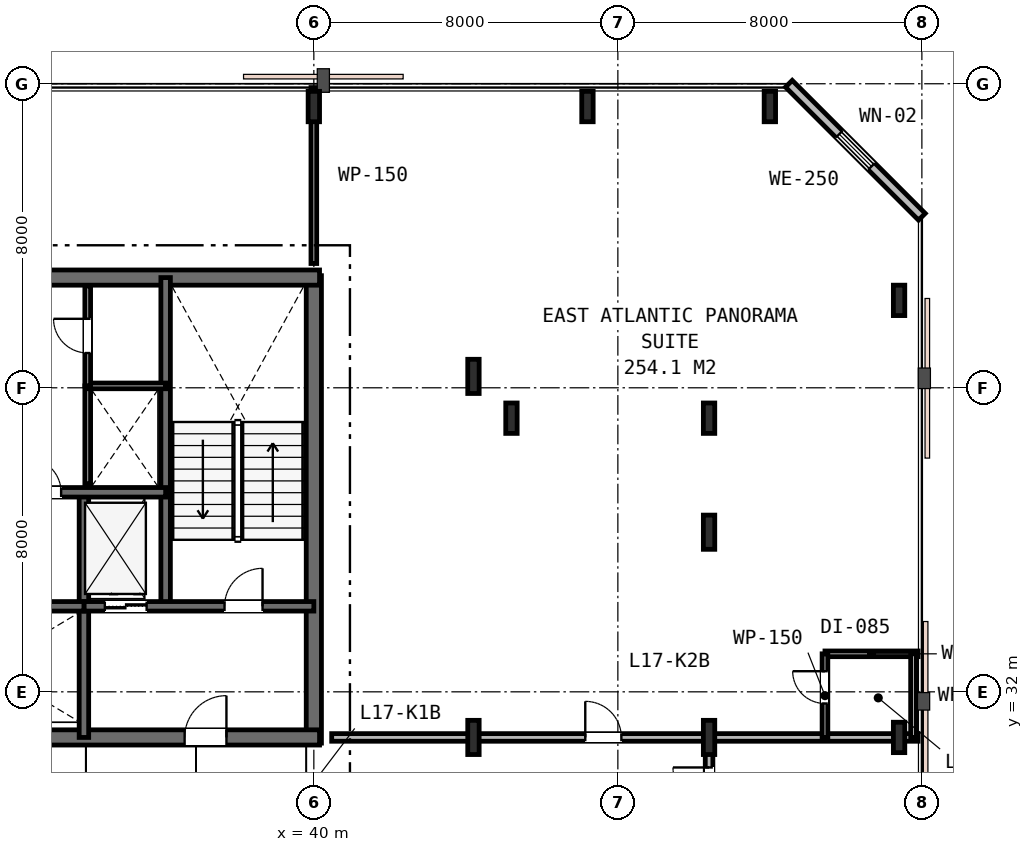
"""IFC4 building model, lengths in metres.
Left out: names, types, materials, properties, quantities, classifications, styles, units other than length and angle.
Written with IfcOpenShell. Run it as: python <this file> out.ifc"""

import sys

from ifc_helpers import new_model, si_unit, direction, frame, frame_2d, origin, origin_2d, place, context, subcontext, project, spatial, rectangle, i_section, extrude, element, fill, save


model = new_model("IFC4")
c1 = context("Model", 3, precision=1e-05, world=origin(), true_north=direction((0.0, 1.0)))
c2 = subcontext(c1, "Body", "Model", "MODEL_VIEW")
j1 = project(units=[si_unit("LENGTHUNIT", "METRE"), si_unit("PLANEANGLEUNIT", "RADIAN")], contexts=[c1])
p1 = place(None, origin())
s1 = spatial("IfcSite", under=j1, at=p1, CompositionType="ELEMENT")
p2 = place(p1, origin())
s2 = spatial("IfcBuilding", under=s1, at=p2, CompositionType="ELEMENT")
p3 = place(p2, frame((0.0, 0.0, 69.0)))
s3 = spatial("IfcBuildingStorey", under=s2, at=p3, CompositionType="ELEMENT", Elevation=69.0)
p4 = place(p3, frame((40.0, 30.65, 0.0), z_axis=(0.0, 0.0, 1.0), x_axis=(0.0, 1.0, 0.0)))
e1 = element("IfcWall", 1, at=p4, inside=s3, PredefinedType="SHEAR", context=c2, shape_type="SweptSolid", body=[
    extrude(rectangle(XDim=12.3, YDim=0.4, at=frame_2d((6.15, 0.0))), origin(), (0.0, 0.0, 1.0), 3.6),
])
p5 = place(p3, frame((15.85, 42.9, 0.0), z_axis=(0.0, 0.0, 1.0), x_axis=(1.0, 0.0, 0.0)))
e2 = element("IfcWall", 2, at=p5, inside=s3, PredefinedType="SHEAR", context=c2, shape_type="SweptSolid", body=[
    extrude(rectangle(XDim=24.3, YDim=0.4, at=frame_2d((12.15, 0.0))), origin(), (0.0, 0.0, 1.0), 3.6),
])
p6 = place(p3, frame((28.95, 30.8, 0.0), z_axis=(0.0, 0.0, 1.0), x_axis=(1.0, 0.0, 0.0)))
e3 = element("IfcWall", 3, at=p6, inside=s3, PredefinedType="SHEAR", context=c2, shape_type="SweptSolid", body=[
    extrude(rectangle(XDim=11.2, YDim=0.4, at=frame_2d((5.6, 0.0))), origin(), (0.0, 0.0, 1.0), 3.6),
])
p7 = place(p6, frame((7.65, 0.0, 0.0)))
e4 = element("IfcOpeningElement", 4, at=p7, cuts=e3, PredefinedType="OPENING", context=c2, shape_type="SweptSolid", body=[
    extrude(rectangle(XDim=1.1, YDim=2.15, at=frame_2d((0.55, 1.075))), frame((0.0, 0.21, 0.0), z_axis=(0.0, -1.0, 0.0), x_axis=(1.0, 0.0, 0.0)), (0.0, 0.0, 1.0), 0.42),
])
p8 = place(p3, frame((36.1, 34.25, 0.0), z_axis=(0.0, 0.0, 1.0), x_axis=(0.0, 1.0, 0.0)))
e5 = element("IfcWall", 5, at=p8, inside=s3, PredefinedType="SHEAR", context=c2, shape_type="SweptSolid", body=[
    extrude(rectangle(XDim=8.65, YDim=0.25, at=frame_2d((4.325, 0.0))), origin(), (0.0, 0.0, 1.0), 3.6),
])
p9 = place(p3, frame((33.95, 30.8, 0.0), z_axis=(0.0, 0.0, 1.0), x_axis=(0.0, 1.0, 0.0)))
e6 = element("IfcWall", 6, at=p9, inside=s3, PredefinedType="SHEAR", context=c2, shape_type="SweptSolid", body=[
    extrude(rectangle(XDim=6.45, YDim=0.25, at=frame_2d((3.225, 0.0))), origin(), (0.0, 0.0, 1.0), 3.6),
])
p10 = place(p3, frame((33.95, 34.25, 0.0), z_axis=(0.0, 0.0, 1.0), x_axis=(1.0, 0.0, 0.0)))
e7 = element("IfcWall", 7, at=p10, inside=s3, PredefinedType="SHEAR", context=c2, shape_type="SweptSolid", body=[
    extrude(rectangle(XDim=6.05, YDim=0.25, at=frame_2d((3.025, 0.0))), origin(), (0.0, 0.0, 1.0), 3.6),
])
p11 = place(p10, frame((3.7, 0.0, 0.0)))
e8 = element("IfcOpeningElement", 8, at=p11, cuts=e7, PredefinedType="OPENING", context=c2, shape_type="SweptSolid", body=[
    extrude(rectangle(XDim=1.0, YDim=2.15, at=frame_2d((0.5, 1.075))), frame((0.0, 0.135, 0.0), z_axis=(0.0, -1.0, 0.0), x_axis=(1.0, 0.0, 0.0)), (0.0, 0.0, 1.0), 0.27),
])
p12 = place(p10, frame((0.55, 0.0, 0.0)))
e9 = element("IfcOpeningElement", 9, at=p12, cuts=e7, PredefinedType="OPENING", context=c2, shape_type="SweptSolid", body=[
    extrude(rectangle(XDim=1.1, YDim=2.15, at=frame_2d((0.55, 1.075))), frame((0.0, 0.135, 0.0), z_axis=(0.0, -1.0, 0.0), x_axis=(1.0, 0.0, 0.0)), (0.0, 0.0, 1.0), 0.27),
])
p13 = place(p3, frame((28.95, 34.25, 0.0), z_axis=(0.0, 0.0, 1.0), x_axis=(1.0, 0.0, 0.0)))
e10 = element("IfcWall", 10, at=p13, inside=s3, PredefinedType="SHEAR", context=c2, shape_type="SweptSolid", body=[
    extrude(rectangle(XDim=5.0, YDim=0.25, at=frame_2d((2.5, 0.0))), origin(), (0.0, 0.0, 1.0), 3.6),
])
p14 = place(p3, frame((19.9, 37.25, 0.0), z_axis=(0.0, 0.0, 1.0), x_axis=(1.0, 0.0, 0.0)))
e11 = element("IfcWall", 11, at=p14, inside=s3, PredefinedType="SHEAR", context=c2, shape_type="SweptSolid", body=[
    extrude(rectangle(XDim=16.2, YDim=0.25, at=frame_2d((8.1, 0.0))), origin(), (0.0, 0.0, 1.0), 3.6),
])
p15 = place(p14, frame((12.55, 0.0, 0.0)))
e12 = element("IfcOpeningElement", 12, at=p15, cuts=e11, PredefinedType="OPENING", context=c2, shape_type="SweptSolid", body=[
    extrude(rectangle(XDim=0.9, YDim=2.15, at=frame_2d((0.45, 1.075))), frame((0.0, 0.135, 0.0), z_axis=(0.0, -1.0, 0.0), x_axis=(1.0, 0.0, 0.0)), (0.0, 0.0, 1.0), 0.27),
])
for number, where, z_axis, x_axis in (
    (13, (45.2, 39.2, 0.0), (0.0, 0.0, 1.0), (1.0, 0.0, 0.0)),
    (14, (40.0, 47.4, 0.0), (0.0, 0.0, 1.0), (1.0, 0.0, 0.0)),
    (15, (47.2, 47.4, 0.0), (0.0, 0.0, 1.0), (1.0, 0.0, 0.0)),
    (16, (50.4, 39.2, 0.0), (0.0, 0.0, 1.0), (1.0, 0.0, 0.0)),
    (17, (55.4, 30.8, 0.0), (0.0, 0.0, 1.0), (1.0, 0.0, 0.0)),
    (18, (55.4, 42.3, 0.0), (0.0, 0.0, 1.0), (1.0, 0.0, 0.0)),
    (19, (52.0, 47.4, 0.0), (0.0, 0.0, 1.0), (1.0, 0.0, 0.0)),
):
    element("IfcColumn", number, at=place(p3, frame(where, z_axis=z_axis, x_axis=x_axis)), inside=s3, PredefinedType="COLUMN", context=c2, shape_type="SweptSolid", body=[
        extrude(i_section(OverallWidth=0.3, OverallDepth=0.8, WebThickness=0.018, FlangeThickness=0.033, FilletRadius=0.03, at=origin_2d()), origin(), (0.0, 0.0, 1.0), 3.6),
    ])
for number, where, z_axis, x_axis in (
    (20, (44.2, 30.8, 0.0), (0.0, 0.0, 1.0), (1.0, 0.0, 0.0)),
    (21, (44.2, 40.3, 0.0), (0.0, 0.0, 1.0), (1.0, 0.0, 0.0)),
    (22, (50.4, 30.8, 0.0), (0.0, 0.0, 1.0), (1.0, 0.0, 0.0)),
    (23, (50.4, 36.2, 0.0), (0.0, 0.0, 1.0), (1.0, 0.0, 0.0)),
):
    element("IfcColumn", number, at=place(p3, frame(where, z_axis=z_axis, x_axis=x_axis)), inside=s3, PredefinedType="COLUMN", context=c2, shape_type="SweptSolid", body=[
        extrude(i_section(OverallWidth=0.3, OverallDepth=0.9, WebThickness=0.018, FlangeThickness=0.035, FilletRadius=0.03, at=origin_2d()), origin(), (0.0, 0.0, 1.0), 3.6),
    ])
p16 = place(p3, frame((56.0, 44.5, 0.0), z_axis=(0.0, 0.0, 1.0), x_axis=(-0.707106781187, 0.707106781187, 0.0)))
e24 = element("IfcWall", 24, at=p16, inside=s3, PredefinedType="STANDARD", context=c2, shape_type="SweptSolid", body=[
    extrude(rectangle(XDim=4.95, YDim=0.25, at=frame_2d((2.475, 0.0))), origin(), (0.0, 0.0, 1.0), 3.33),
])
p17 = place(p16, frame((1.875, 0.0, 0.85)))
e25 = element("IfcOpeningElement", 25, at=p17, cuts=e24, PredefinedType="OPENING", context=c2, shape_type="SweptSolid", body=[
    extrude(rectangle(XDim=1.2, YDim=1.6, at=frame_2d((0.6, 0.8))), frame((0.0, 0.135, 0.0), z_axis=(0.0, -1.0, 0.0), x_axis=(1.0, 0.0, 0.0)), (0.0, 0.0, 1.0), 0.27),
])
p18 = place(p3, frame((34.05, 37.473, 0.0), z_axis=(0.0, 0.0, 1.0), x_axis=(0.0, 1.0, 0.0)))
e26 = element("IfcWall", 26, at=p18, inside=s3, PredefinedType="PLUMBINGWALL", context=c2, shape_type="SweptSolid", body=[
    extrude(rectangle(XDim=2.577, YDim=0.15, at=frame_2d((1.288, 0.0))), origin(), (0.0, 0.0, 1.0), 3.33),
])
p19 = place(p3, frame((34.05, 40.05, 0.0), z_axis=(0.0, 0.0, 1.0), x_axis=(1.0, 0.0, 0.0)))
e27 = element("IfcWall", 27, at=p19, inside=s3, PredefinedType="PARTITIONING", context=c2, shape_type="SweptSolid", body=[
    extrude(rectangle(XDim=2.05, YDim=0.15, at=frame_2d((1.025, 0.0))), origin(), (0.0, 0.0, 1.0), 3.33),
])
p20 = place(p3, frame((34.05, 40.05, 0.0), z_axis=(0.0, 0.0, 1.0), x_axis=(0.0, 1.0, 0.0)))
e28 = element("IfcWall", 28, at=p20, inside=s3, PredefinedType="PARTITIONING", context=c2, shape_type="SweptSolid", body=[
    extrude(rectangle(XDim=2.63, YDim=0.15, at=frame_2d((1.315, 0.0))), origin(), (0.0, 0.0, 1.0), 3.33),
])
p21 = place(p20, frame((0.865, 0.0, 0.0)))
e29 = element("IfcOpeningElement", 29, at=p21, cuts=e28, PredefinedType="OPENING", context=c2, shape_type="SweptSolid", body=[
    extrude(rectangle(XDim=0.9, YDim=2.15, at=frame_2d((0.45, 1.075))), frame((0.0, 0.085, 0.0), z_axis=(0.0, -1.0, 0.0), x_axis=(1.0, 0.0, 0.0)), (0.0, 0.0, 1.0), 0.17),
])
p22 = place(p3, frame((40.0, 43.27, 0.0), z_axis=(0.0, 0.0, 1.0), x_axis=(0.0, 1.0, 0.0)))
e30 = element("IfcWall", 30, at=p22, inside=s3, PredefinedType="PARTITIONING", context=c2, shape_type="SweptSolid", body=[
    extrude(rectangle(XDim=4.63, YDim=0.15, at=frame_2d((2.315, 0.0))), origin(), (0.0, 0.0, 1.0), 2.92),
])
p23 = place(p3, frame((40.47, 30.8, 0.0), z_axis=(0.0, 0.0, 1.0), x_axis=(1.0, 0.0, 0.0)))
e31 = element("IfcWall", 31, at=p23, inside=s3, PredefinedType="PARTITIONING", context=c2, shape_type="SweptSolid", body=[
    extrude(rectangle(XDim=15.43, YDim=0.2, at=frame_2d((7.715, 0.0))), origin(), (0.0, 0.0, 1.0), 2.83),
])
p24 = place(p23, frame((6.673, 0.0, 0.0)))
e32 = element("IfcOpeningElement", 32, at=p24, cuts=e31, PredefinedType="OPENING", context=c2, shape_type="SweptSolid", body=[
    extrude(rectangle(XDim=0.95, YDim=2.15, at=frame_2d((0.475, 1.075))), frame((0.0, 0.11, 0.0), z_axis=(0.0, -1.0, 0.0), x_axis=(1.0, 0.0, 0.0)), (0.0, 0.0, 1.0), 0.22),
])
p25 = place(p3, frame((53.45, 33.0, 0.0), z_axis=(0.0, 0.0, 1.0), x_axis=(1.0, 0.0, 0.0)))
e33 = element("IfcWall", 33, at=p25, inside=s3, PredefinedType="PARTITIONING", context=c2, shape_type="SweptSolid", body=[
    extrude(rectangle(XDim=2.45, YDim=0.15, at=frame_2d((1.225, 0.0))), origin(), (0.0, 0.0, 1.0), 2.92),
])
p26 = place(p3, frame((53.45, 30.8, 0.0), z_axis=(0.0, 0.0, 1.0), x_axis=(0.0, 1.0, 0.0)))
e34 = element("IfcWall", 34, at=p26, inside=s3, PredefinedType="PARTITIONING", context=c2, shape_type="SweptSolid", body=[
    extrude(rectangle(XDim=2.2, YDim=0.15, at=frame_2d((1.1, 0.0))), origin(), (0.0, 0.0, 1.0), 2.83),
])
p27 = place(p26, frame((0.892, 0.0, 0.0)))
e35 = element("IfcOpeningElement", 35, at=p27, cuts=e34, PredefinedType="OPENING", context=c2, shape_type="SweptSolid", body=[
    extrude(rectangle(XDim=0.85, YDim=2.15, at=frame_2d((0.425, 1.075))), frame((0.0, 0.085, 0.0), z_axis=(0.0, -1.0, 0.0), x_axis=(1.0, 0.0, 0.0)), (0.0, 0.0, 1.0), 0.17),
])
p28 = place(p3, frame((55.78, 33.0, 0.0), z_axis=(0.0, 0.0, 1.0), x_axis=(0.0, -1.0, 0.0)))
e36 = element("IfcWall", 36, at=p28, inside=s3, PredefinedType="PARTITIONING", context=c2, shape_type="SweptSolid", body=[
    extrude(rectangle(XDim=2.2, YDim=0.15, at=frame_2d((1.1, 0.0))), origin(), (0.0, 0.0, 1.0), 2.83),
])
p29 = place(p3, frame((50.4, 28.6, 0.0), z_axis=(0.0, 0.0, 1.0), x_axis=(0.0, 1.0, 0.0)))
e37 = element("IfcWall", 37, at=p29, inside=s3, PredefinedType="PARTITIONING", context=c2, shape_type="SweptSolid", body=[
    extrude(rectangle(XDim=2.2, YDim=0.2, at=frame_2d((1.1, 0.0))), origin(), (0.0, 0.0, 1.0), 2.83),
])
p30 = place(p29, frame((0.46, 0.0, 0.0)))
e38 = element("IfcOpeningElement", 38, at=p30, cuts=e37, PredefinedType="OPENING", context=c2, shape_type="SweptSolid", body=[
    extrude(rectangle(XDim=0.95, YDim=2.15, at=frame_2d((0.475, 1.075))), frame((0.0, 0.11, 0.0), z_axis=(0.0, -1.0, 0.0), x_axis=(1.0, 0.0, 0.0)), (0.0, 0.0, 1.0), 0.22),
])
p31 = place(p17, origin())
e39 = element("IfcWindow", 39, at=p31, inside=s3, PartitioningType="SINGLE_PANEL", PredefinedType="WINDOW", context=c2, shape_type="SweptSolid", body=[
    extrude(rectangle(XDim=1.2, YDim=1.6, at=frame_2d((0.6, 0.8))), frame((0.0, 0.03, 0.0), z_axis=(0.0, -1.0, 0.0), x_axis=(1.0, 0.0, 0.0)), (0.0, 0.0, 1.0), 0.06),
])
fill(e25, e39)
p32 = place(p11, origin())
e40 = element("IfcDoor", 40, at=p32, inside=s3, OperationType="SINGLE_SWING_RIGHT", PredefinedType="DOOR", context=c2, shape_type="SweptSolid", body=[
    extrude(rectangle(XDim=1.0, YDim=2.15, at=frame_2d((0.5, 1.075))), frame((0.0, 0.025, 0.0), z_axis=(0.0, -1.0, 0.0), x_axis=(1.0, 0.0, 0.0)), (0.0, 0.0, 1.0), 0.05),
])
fill(e8, e40)
p33 = place(p7, origin())
e41 = element("IfcDoor", 41, at=p33, inside=s3, OperationType="SINGLE_SWING_RIGHT", PredefinedType="DOOR", context=c2, shape_type="SweptSolid", body=[
    extrude(rectangle(XDim=1.1, YDim=2.15, at=frame_2d((0.55, 1.075))), frame((0.0, 0.025, 0.0), z_axis=(0.0, -1.0, 0.0), x_axis=(1.0, 0.0, 0.0)), (0.0, 0.0, 1.0), 0.05),
])
fill(e4, e41)
p34 = place(p15, origin())
e42 = element("IfcDoor", 42, at=p34, inside=s3, OperationType="SINGLE_SWING_LEFT", PredefinedType="DOOR", context=c2, shape_type="SweptSolid", body=[
    extrude(rectangle(XDim=0.9, YDim=2.15, at=frame_2d((0.45, 1.075))), frame((0.0, 0.025, 0.0), z_axis=(0.0, -1.0, 0.0), x_axis=(1.0, 0.0, 0.0)), (0.0, 0.0, 1.0), 0.05),
])
fill(e12, e42)
p35 = place(p21, origin())
e43 = element("IfcDoor", 43, at=p35, inside=s3, OperationType="SINGLE_SWING_RIGHT", PredefinedType="DOOR", context=c2, shape_type="SweptSolid", body=[
    extrude(rectangle(XDim=0.9, YDim=2.15, at=frame_2d((0.45, 1.075))), frame((0.0, 0.025, 0.0), z_axis=(0.0, -1.0, 0.0), x_axis=(1.0, 0.0, 0.0)), (0.0, 0.0, 1.0), 0.05),
])
fill(e29, e43)
p36 = place(p24, origin())
e44 = element("IfcDoor", 44, at=p36, inside=s3, OperationType="SINGLE_SWING_LEFT", PredefinedType="DOOR", context=c2, shape_type="SweptSolid", body=[
    extrude(rectangle(XDim=0.95, YDim=2.15, at=frame_2d((0.475, 1.075))), frame((0.0, 0.025, 0.0), z_axis=(0.0, -1.0, 0.0), x_axis=(1.0, 0.0, 0.0)), (0.0, 0.0, 1.0), 0.05),
])
fill(e32, e44)
p37 = place(p27, origin())
e45 = element("IfcDoor", 45, at=p37, inside=s3, OperationType="SINGLE_SWING_RIGHT", PredefinedType="DOOR", context=c2, shape_type="SweptSolid", body=[
    extrude(rectangle(XDim=0.85, YDim=2.15, at=frame_2d((0.425, 1.075))), frame((0.0, 0.025, 0.0), z_axis=(0.0, -1.0, 0.0), x_axis=(1.0, 0.0, 0.0)), (0.0, 0.0, 1.0), 0.05),
])
fill(e35, e45)
p38 = place(p30, origin())
e46 = element("IfcDoor", 46, at=p38, inside=s3, OperationType="SINGLE_SWING_RIGHT", PredefinedType="DOOR", context=c2, shape_type="SweptSolid", body=[
    extrude(rectangle(XDim=0.95, YDim=2.15, at=frame_2d((0.475, 1.075))), frame((0.0, 0.025, 0.0), z_axis=(0.0, -1.0, 0.0), x_axis=(1.0, 0.0, 0.0)), (0.0, 0.0, 1.0), 0.05),
])
fill(e38, e46)
p39 = place(p12, origin())
e47 = element("IfcDoor", 47, at=p39, inside=s3, OperationType="DOUBLE_DOOR_SLIDING", PredefinedType="DOOR", context=c2, shape_type="SweptSolid", body=[
    extrude(rectangle(XDim=1.1, YDim=2.15, at=frame_2d((0.55, 1.075))), frame((0.0, 0.025, 0.0), z_axis=(0.0, -1.0, 0.0), x_axis=(1.0, 0.0, 0.0)), (0.0, 0.0, 1.0), 0.05),
])
fill(e9, e47)
save(model, sys.argv[1])
